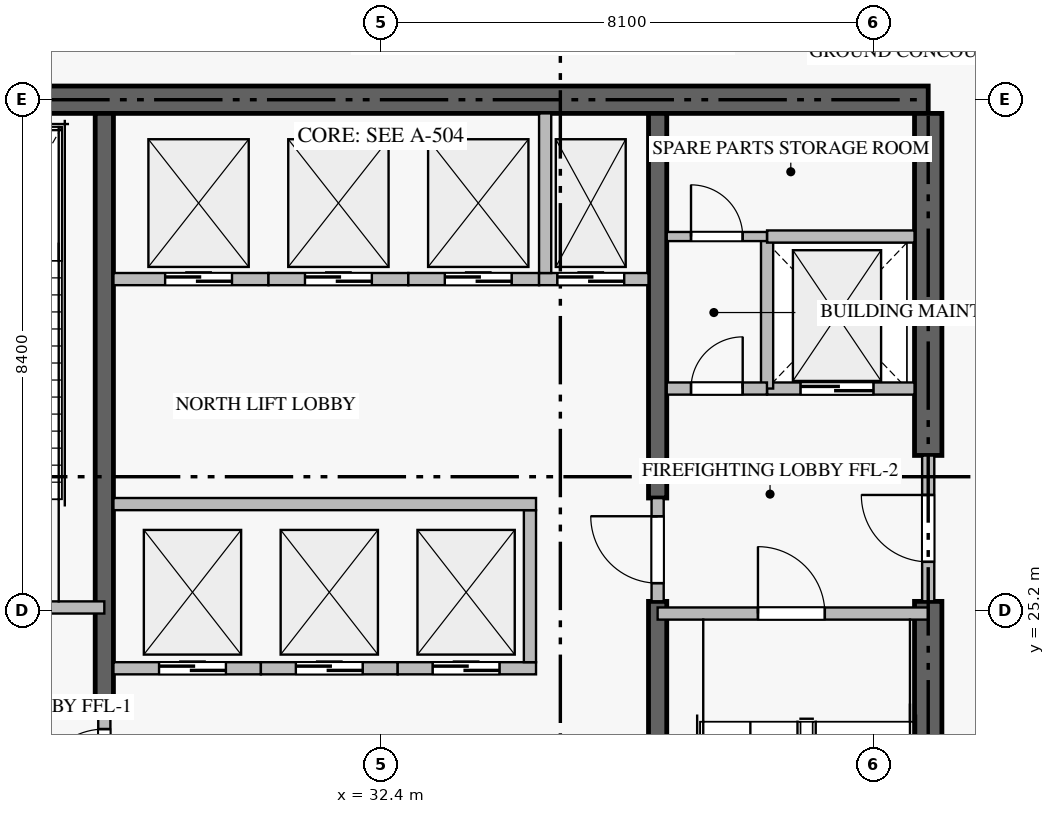
"""IFC4 building model, lengths in metres.
Left out: names, types, materials, properties, quantities, classifications, styles, units other than length and angle.
Written with IfcOpenShell. Run it as: python <this file> out.ifc"""

import sys

from ifc_helpers import new_model, si_unit, direction, frame, frame_2d, origin, place, context, subcontext, project, spatial, rectangle, extrude, source, transform, mapped, element, fill, save


model = new_model("IFC4")
c1 = context("Model", 3, precision=1e-05, world=origin(), true_north=direction((0.0, 1.0)))
c2 = subcontext(c1, "Body", "Model", "MODEL_VIEW")
j1 = project(units=[si_unit("LENGTHUNIT", "METRE"), si_unit("PLANEANGLEUNIT", "RADIAN")], contexts=[c1])
p1 = place(None, origin())
s1 = spatial("IfcSite", under=j1, at=p1, CompositionType="ELEMENT")
p2 = place(p1, origin())
s2 = spatial("IfcBuilding", under=s1, at=p2, CompositionType="ELEMENT")
p3 = place(p2, origin())
s3 = spatial("IfcBuildingStorey", under=s2, at=p3, CompositionType="ELEMENT", Elevation=0.0)
p4 = place(p3, frame((41.4, 33.6, -0.38), z_axis=(0.0, 0.0, 1.0), x_axis=(-1.0, 0.0, 0.0)))
e1 = element("IfcWall", 1, at=p4, inside=s3, PredefinedType="SHEAR", context=c2, shape_type="SweptSolid", body=[
    extrude(rectangle(XDim=18.0, YDim=0.45, at=frame_2d((9.0, 0.0))), origin(), (0.0, 0.0, 1.0), 5.498),
])
p5 = place(p3, frame((41.4, 17.025, -0.38), z_axis=(0.0, 0.0, 1.0), x_axis=(0.0, 1.0, 0.0)))
e2 = element("IfcWall", 2, at=p5, inside=s3, PredefinedType="SHEAR", context=c2, shape_type="SweptSolid", body=[
    extrude(rectangle(XDim=8.325, YDim=0.45, at=frame_2d((4.163, 0.0))), origin(), (0.0, 0.0, 1.0), 5.498),
])
p6 = place(p3, frame((41.4, 27.75, -0.38), z_axis=(0.0, 0.0, 1.0), x_axis=(0.0, 1.0, 0.0)))
e3 = element("IfcWall", 3, at=p6, inside=s3, PredefinedType="SHEAR", context=c2, shape_type="SweptSolid", body=[
    extrude(rectangle(XDim=5.625, YDim=0.45, at=frame_2d((2.812, 0.0))), origin(), (0.0, 0.0, 1.0), 5.498),
])
p7 = place(p3, frame((27.85, 23.55, -0.38), z_axis=(0.0, 0.0, 1.0), x_axis=(0.0, 1.0, 0.0)))
e4 = element("IfcWall", 4, at=p7, inside=s3, PredefinedType="SHEAR", context=c2, shape_type="SweptSolid", body=[
    extrude(rectangle(XDim=9.825, YDim=0.3, at=frame_2d((4.913, 0.0))), origin(), (0.0, 0.0, 1.0), 5.498),
])
p8 = place(p3, frame((36.95, 17.025, -0.38), z_axis=(0.0, 0.0, 1.0), x_axis=(0.0, 1.0, 0.0)))
e5 = element("IfcWall", 5, at=p8, inside=s3, PredefinedType="SHEAR", context=c2, shape_type="SweptSolid", body=[
    extrude(rectangle(XDim=8.325, YDim=0.3, at=frame_2d((4.163, 0.0))), origin(), (0.0, 0.0, 1.0), 5.498),
])
p9 = place(p3, frame((36.95, 27.05, -0.38), z_axis=(0.0, 0.0, 1.0), x_axis=(0.0, 1.0, 0.0)))
e6 = element("IfcWall", 6, at=p9, inside=s3, PredefinedType="SHEAR", context=c2, shape_type="SweptSolid", body=[
    extrude(rectangle(XDim=6.325, YDim=0.3, at=frame_2d((3.163, 0.0))), origin(), (0.0, 0.0, 1.0), 5.498),
])
p10 = place(p3, frame((23.4, 25.25, 0.0), z_axis=(0.0, 0.0, 1.0), x_axis=(1.0, 0.0, 0.0)))
e7 = element("IfcWall", 7, at=p10, inside=s3, PredefinedType="STANDARD", context=c2, shape_type="SweptSolid", body=[
    extrude(rectangle(XDim=4.45, YDim=0.2, at=frame_2d((2.225, 0.0))), origin(), (0.0, 0.0, 1.0), 5.12),
])
p11 = place(p10, frame((1.65, 0.0, 0.0)))
e8 = element("IfcOpeningElement", 8, at=p11, cuts=e7, PredefinedType="OPENING", context=c2, shape_type="SweptSolid", body=[
    extrude(rectangle(XDim=1.1, YDim=2.15, at=frame_2d((0.55, 1.075))), frame((0.0, 0.11, 0.0), z_axis=(0.0, -1.0, 0.0), x_axis=(1.0, 0.0, 0.0)), (0.0, 0.0, 1.0), 0.22),
])
p12 = place(p3, frame((36.95, 25.15, 0.0), z_axis=(0.0, 0.0, 1.0), x_axis=(1.0, 0.0, 0.0)))
e9 = element("IfcWall", 9, at=p12, inside=s3, PredefinedType="STANDARD", context=c2, shape_type="SweptSolid", body=[
    extrude(rectangle(XDim=4.45, YDim=0.2, at=frame_2d((2.225, 0.0))), origin(), (0.0, 0.0, 1.0), 5.12),
])
p13 = place(p12, frame((1.65, 0.0, 0.0)))
e10 = element("IfcOpeningElement", 10, at=p13, cuts=e9, PredefinedType="OPENING", context=c2, shape_type="SweptSolid", body=[
    extrude(rectangle(XDim=1.1, YDim=2.15, at=frame_2d((0.55, 1.075))), frame((0.0, 0.11, 0.0), z_axis=(0.0, -1.0, 0.0), x_axis=(1.0, 0.0, 0.0)), (0.0, 0.0, 1.0), 0.22),
])
p14 = place(p3, frame((38.75, 28.85, 0.0), z_axis=(0.0, 0.0, 1.0), x_axis=(1.0, 0.0, 0.0)))
e11 = element("IfcWall", 11, at=p14, inside=s3, PredefinedType="STANDARD", context=c2, shape_type="SweptSolid", body=[
    extrude(rectangle(XDim=2.425, YDim=0.2, at=frame_2d((1.212, 0.0))), origin(), (0.0, 0.0, 1.0), 5.12),
])
p15 = place(p14, frame((0.55, 0.0, 0.0)))
e12 = element("IfcOpeningElement", 12, at=p15, cuts=e11, PredefinedType="OPENING", context=c2, shape_type="SweptSolid", body=[
    extrude(rectangle(XDim=1.2, YDim=2.2, at=frame_2d((0.6, 1.1))), frame((0.0, 0.11, 0.0), z_axis=(0.0, -1.0, 0.0), x_axis=(1.0, 0.0, 0.0)), (0.0, 0.0, 1.0), 0.22),
])
p16 = place(p3, frame((28.0, 24.25, 0.0), z_axis=(0.0, 0.0, 1.0), x_axis=(1.0, 0.0, 0.0)))
e13 = element("IfcWall", 13, at=p16, inside=s3, PredefinedType="STANDARD", context=c2, shape_type="SweptSolid", body=[
    extrude(rectangle(XDim=2.425, YDim=0.2, at=frame_2d((1.212, 0.0))), origin(), (0.0, 0.0, 1.0), 5.12),
])
p17 = place(p16, frame((0.75, 0.0, 0.0)))
e14 = element("IfcOpeningElement", 14, at=p17, cuts=e13, PredefinedType="OPENING", context=c2, shape_type="SweptSolid", body=[
    extrude(rectangle(XDim=1.1, YDim=2.2, at=frame_2d((0.55, 1.1))), frame((0.0, 0.11, 0.0), z_axis=(0.0, -1.0, 0.0), x_axis=(1.0, 0.0, 0.0)), (0.0, 0.0, 1.0), 0.22),
])
p18 = place(p3, frame((30.425, 24.25, 0.0), z_axis=(0.0, 0.0, 1.0), x_axis=(1.0, 0.0, 0.0)))
e15 = element("IfcWall", 15, at=p18, inside=s3, PredefinedType="STANDARD", context=c2, shape_type="SweptSolid", body=[
    extrude(rectangle(XDim=2.25, YDim=0.2, at=frame_2d((1.125, 0.0))), origin(), (0.0, 0.0, 1.0), 5.12),
])
p19 = place(p18, frame((0.575, 0.0, 0.0)))
e16 = element("IfcOpeningElement", 16, at=p19, cuts=e15, PredefinedType="OPENING", context=c2, shape_type="SweptSolid", body=[
    extrude(rectangle(XDim=1.1, YDim=2.2, at=frame_2d((0.55, 1.1))), frame((0.0, 0.11, 0.0), z_axis=(0.0, -1.0, 0.0), x_axis=(1.0, 0.0, 0.0)), (0.0, 0.0, 1.0), 0.22),
])
p20 = place(p3, frame((32.675, 24.25, 0.0), z_axis=(0.0, 0.0, 1.0), x_axis=(1.0, 0.0, 0.0)))
e17 = element("IfcWall", 17, at=p20, inside=s3, PredefinedType="STANDARD", context=c2, shape_type="SweptSolid", body=[
    extrude(rectangle(XDim=2.275, YDim=0.2, at=frame_2d((1.137, 0.0))), origin(), (0.0, 0.0, 1.0), 5.12),
])
p21 = place(p20, frame((0.575, 0.0, 0.0)))
e18 = element("IfcOpeningElement", 18, at=p21, cuts=e17, PredefinedType="OPENING", context=c2, shape_type="SweptSolid", body=[
    extrude(rectangle(XDim=1.1, YDim=2.2, at=frame_2d((0.55, 1.1))), frame((0.0, 0.11, 0.0), z_axis=(0.0, -1.0, 0.0), x_axis=(1.0, 0.0, 0.0)), (0.0, 0.0, 1.0), 0.22),
])
p22 = place(p3, frame((34.85, 24.35, 0.0), z_axis=(0.0, 0.0, 1.0), x_axis=(0.0, 1.0, 0.0)))
e19 = element("IfcWall", 19, at=p22, inside=s3, PredefinedType="STANDARD", context=c2, shape_type="SweptSolid", body=[
    extrude(rectangle(XDim=2.5, YDim=0.2, at=frame_2d((1.25, 0.0))), origin(), (0.0, 0.0, 1.0), 5.12),
])
p23 = place(p3, frame((28.0, 30.65, 0.0), z_axis=(0.0, 0.0, 1.0), x_axis=(1.0, 0.0, 0.0)))
e20 = element("IfcWall", 20, at=p23, inside=s3, PredefinedType="STANDARD", context=c2, shape_type="SweptSolid", body=[
    extrude(rectangle(XDim=2.55, YDim=0.2, at=frame_2d((1.275, 0.0))), origin(), (0.0, 0.0, 1.0), 5.12),
])
p24 = place(p23, frame((0.85, 0.0, 0.0)))
e21 = element("IfcOpeningElement", 21, at=p24, cuts=e20, PredefinedType="OPENING", context=c2, shape_type="SweptSolid", body=[
    extrude(rectangle(XDim=1.1, YDim=2.2, at=frame_2d((0.55, 1.1))), frame((0.0, 0.11, 0.0), z_axis=(0.0, -1.0, 0.0), x_axis=(1.0, 0.0, 0.0)), (0.0, 0.0, 1.0), 0.22),
])
p25 = place(p3, frame((30.55, 30.65, 0.0), z_axis=(0.0, 0.0, 1.0), x_axis=(1.0, 0.0, 0.0)))
e22 = element("IfcWall", 22, at=p25, inside=s3, PredefinedType="STANDARD", context=c2, shape_type="SweptSolid", body=[
    extrude(rectangle(XDim=2.3, YDim=0.2, at=frame_2d((1.15, 0.0))), origin(), (0.0, 0.0, 1.0), 5.12),
])
p26 = place(p25, frame((0.6, 0.0, 0.0)))
e23 = element("IfcOpeningElement", 23, at=p26, cuts=e22, PredefinedType="OPENING", context=c2, shape_type="SweptSolid", body=[
    extrude(rectangle(XDim=1.1, YDim=2.2, at=frame_2d((0.55, 1.1))), frame((0.0, 0.11, 0.0), z_axis=(0.0, -1.0, 0.0), x_axis=(1.0, 0.0, 0.0)), (0.0, 0.0, 1.0), 0.22),
])
p27 = place(p3, frame((32.85, 30.65, 0.0), z_axis=(0.0, 0.0, 1.0), x_axis=(1.0, 0.0, 0.0)))
e24 = element("IfcWall", 24, at=p27, inside=s3, PredefinedType="STANDARD", context=c2, shape_type="SweptSolid", body=[
    extrude(rectangle(XDim=2.15, YDim=0.2, at=frame_2d((1.075, 0.0))), origin(), (0.0, 0.0, 1.0), 5.12),
])
p28 = place(p27, frame((0.6, 0.0, 0.0)))
e25 = element("IfcOpeningElement", 25, at=p28, cuts=e24, PredefinedType="OPENING", context=c2, shape_type="SweptSolid", body=[
    extrude(rectangle(XDim=1.1, YDim=2.2, at=frame_2d((0.55, 1.1))), frame((0.0, 0.11, 0.0), z_axis=(0.0, -1.0, 0.0), x_axis=(1.0, 0.0, 0.0)), (0.0, 0.0, 1.0), 0.22),
])
p29 = place(p3, frame((35.0, 30.65, 0.0), z_axis=(0.0, 0.0, 1.0), x_axis=(1.0, 0.0, 0.0)))
e26 = element("IfcWall", 26, at=p29, inside=s3, PredefinedType="STANDARD", context=c2, shape_type="SweptSolid", body=[
    extrude(rectangle(XDim=1.8, YDim=0.2, at=frame_2d((0.9, 0.0))), origin(), (0.0, 0.0, 1.0), 5.12),
])
p30 = place(p29, frame((0.3, 0.0, 0.0)))
e27 = element("IfcOpeningElement", 27, at=p30, cuts=e26, PredefinedType="OPENING", context=c2, shape_type="SweptSolid", body=[
    extrude(rectangle(XDim=1.1, YDim=2.2, at=frame_2d((0.55, 1.1))), frame((0.0, 0.11, 0.0), z_axis=(0.0, -1.0, 0.0), x_axis=(1.0, 0.0, 0.0)), (0.0, 0.0, 1.0), 0.22),
])
p31 = place(p3, frame((35.1, 30.75, 0.0), z_axis=(0.0, 0.0, 1.0), x_axis=(0.0, 1.0, 0.0)))
e28 = element("IfcWall", 28, at=p31, inside=s3, PredefinedType="STANDARD", context=c2, shape_type="SweptSolid", body=[
    extrude(rectangle(XDim=2.625, YDim=0.2, at=frame_2d((1.312, 0.0))), origin(), (0.0, 0.0, 1.0), 5.12),
])
p32 = place(p3, frame((38.75, 28.85, 0.0), z_axis=(0.0, 0.0, 1.0), x_axis=(0.0, 1.0, 0.0)))
e29 = element("IfcWall", 29, at=p32, inside=s3, PredefinedType="STANDARD", context=c2, shape_type="SweptSolid", body=[
    extrude(rectangle(XDim=2.5, YDim=0.2, at=frame_2d((1.25, 0.0))), origin(), (0.0, 0.0, 1.0), 5.12),
])
p33 = place(p3, frame((38.75, 31.35, 0.0), z_axis=(0.0, 0.0, 1.0), x_axis=(1.0, 0.0, 0.0)))
e30 = element("IfcWall", 30, at=p33, inside=s3, PredefinedType="STANDARD", context=c2, shape_type="SweptSolid", body=[
    extrude(rectangle(XDim=2.425, YDim=0.2, at=frame_2d((1.212, 0.0))), origin(), (0.0, 0.0, 1.0), 5.12),
])
p34 = place(p3, frame((37.1, 28.85, 0.0), z_axis=(0.0, 0.0, 1.0), x_axis=(1.0, 0.0, 0.0)))
e31 = element("IfcWall", 31, at=p34, inside=s3, PredefinedType="STANDARD", context=c2, shape_type="SweptSolid", body=[
    extrude(rectangle(XDim=1.648, YDim=0.2, at=frame_2d((0.824, 0.0))), origin(), (0.0, 0.0, 1.0), 5.12),
])
p35 = place(p34, frame((0.399, 0.0, 0.0)))
e32 = element("IfcOpeningElement", 32, at=p35, cuts=e31, PredefinedType="OPENING", context=c2, shape_type="SweptSolid", body=[
    extrude(rectangle(XDim=0.85, YDim=2.1, at=frame_2d((0.425, 1.05))), frame((0.0, 0.11, 0.0), z_axis=(0.0, -1.0, 0.0), x_axis=(1.0, 0.0, 0.0)), (0.0, 0.0, 1.0), 0.22),
])
p36 = place(p3, frame((41.4, 25.352, 0.0), z_axis=(0.0, 0.0, 1.0), x_axis=(0.0, 1.0, 0.0)))
e33 = element("IfcWall", 33, at=p36, inside=s3, PredefinedType="STANDARD", context=c2, shape_type="SweptSolid", body=[
    extrude(rectangle(XDim=2.396, YDim=0.2, at=frame_2d((1.198, 0.0))), origin(), (0.0, 0.0, 1.0), 5.12),
])
p37 = place(p36, frame((0.648, 0.0, 0.0)))
e34 = element("IfcOpeningElement", 34, at=p37, cuts=e33, PredefinedType="OPENING", context=c2, shape_type="SweptSolid", body=[
    extrude(rectangle(XDim=1.1, YDim=2.15, at=frame_2d((0.55, 1.075))), frame((0.0, 0.11, 0.0), z_axis=(0.0, -1.0, 0.0), x_axis=(1.0, 0.0, 0.0)), (0.0, 0.0, 1.0), 0.22),
])
p38 = place(p3, frame((27.85, 21.852, 0.0), z_axis=(0.0, 0.0, 1.0), x_axis=(0.0, 1.0, 0.0)))
e35 = element("IfcWall", 35, at=p38, inside=s3, PredefinedType="STANDARD", context=c2, shape_type="SweptSolid", body=[
    extrude(rectangle(XDim=1.696, YDim=0.2, at=frame_2d((0.848, 0.0))), origin(), (0.0, 0.0, 1.0), 5.12),
])
p39 = place(p38, frame((0.298, 0.0, 0.0)))
e36 = element("IfcOpeningElement", 36, at=p39, cuts=e35, PredefinedType="OPENING", context=c2, shape_type="SweptSolid", body=[
    extrude(rectangle(XDim=1.1, YDim=2.15, at=frame_2d((0.55, 1.075))), frame((0.0, 0.11, 0.0), z_axis=(0.0, -1.0, 0.0), x_axis=(1.0, 0.0, 0.0)), (0.0, 0.0, 1.0), 0.22),
])
p40 = place(p3, frame((36.95, 25.352, 0.0), z_axis=(0.0, 0.0, 1.0), x_axis=(0.0, 1.0, 0.0)))
e37 = element("IfcWall", 37, at=p40, inside=s3, PredefinedType="STANDARD", context=c2, shape_type="SweptSolid", body=[
    extrude(rectangle(XDim=1.696, YDim=0.2, at=frame_2d((0.848, 0.0))), origin(), (0.0, 0.0, 1.0), 5.12),
])
p41 = place(p40, frame((0.298, 0.0, 0.0)))
e38 = element("IfcOpeningElement", 38, at=p41, cuts=e37, PredefinedType="OPENING", context=c2, shape_type="SweptSolid", body=[
    extrude(rectangle(XDim=1.1, YDim=2.15, at=frame_2d((0.55, 1.075))), frame((0.0, 0.11, 0.0), z_axis=(0.0, -1.0, 0.0), x_axis=(1.0, 0.0, 0.0)), (0.0, 0.0, 1.0), 0.22),
])
p42 = place(p3, frame((28.0, 26.95, 0.0), z_axis=(0.0, 0.0, 1.0), x_axis=(1.0, 0.0, 0.0)))
e39 = element("IfcWall", 39, at=p42, inside=s3, PredefinedType="STANDARD", context=c2, shape_type="SweptSolid", body=[
    extrude(rectangle(XDim=6.95, YDim=0.2, at=frame_2d((3.475, 0.0))), origin(), (0.0, 0.0, 1.0), 5.12),
])
p43 = place(p3, frame((37.1, 31.35, 0.0), z_axis=(0.0, 0.0, 1.0), x_axis=(1.0, 0.0, 0.0)))
e40 = element("IfcWall", 40, at=p43, inside=s3, PredefinedType="PARTITIONING", context=c2, shape_type="SweptSolid", body=[
    extrude(rectangle(XDim=1.648, YDim=0.15, at=frame_2d((0.824, 0.0))), origin(), (0.0, 0.0, 1.0), 5.12),
])
p44 = place(p43, frame((0.399, 0.0, 0.0)))
e41 = element("IfcOpeningElement", 41, at=p44, cuts=e40, PredefinedType="OPENING", context=c2, shape_type="SweptSolid", body=[
    extrude(rectangle(XDim=0.85, YDim=2.1, at=frame_2d((0.425, 1.05))), frame((0.0, 0.085, 0.0), z_axis=(0.0, -1.0, 0.0), x_axis=(1.0, 0.0, 0.0)), (0.0, 0.0, 1.0), 0.17),
])
m1 = source(origin(), c2, "Body", "SweptSolid", [
    extrude(rectangle(XDim=1.1, YDim=2.15, at=frame_2d((0.55, 1.075))), frame((0.0, 0.025, 0.0), z_axis=(0.0, -1.0, 0.0), x_axis=(1.0, 0.0, 0.0)), (0.0, 0.0, 1.0), 0.05),
])
p45 = place(p13, origin())
e42 = element("IfcDoor", 42, at=p45, inside=s3, OperationType="SINGLE_SWING_LEFT", PredefinedType="DOOR", context=c2, shape_type="MappedRepresentation", body=[
    mapped(m1, transform((0.0, 0.0, 0.0), scale=1.0)),
])
fill(e10, e42)
m2 = source(origin(), c2, "Body", "SweptSolid", [
    extrude(rectangle(XDim=1.2, YDim=2.2, at=frame_2d((0.6, 1.1))), frame((0.0, 0.025, 0.0), z_axis=(0.0, -1.0, 0.0), x_axis=(1.0, 0.0, 0.0)), (0.0, 0.0, 1.0), 0.05),
])
p46 = place(p15, origin())
e43 = element("IfcDoor", 43, at=p46, inside=s3, OperationType="DOUBLE_DOOR_SLIDING", PredefinedType="DOOR", context=c2, shape_type="MappedRepresentation", body=[
    mapped(m2, transform((0.0, 0.0, 0.0), scale=1.0)),
])
fill(e12, e43)
m3 = source(origin(), c2, "Body", "SweptSolid", [
    extrude(rectangle(XDim=1.1, YDim=2.2, at=frame_2d((0.55, 1.1))), frame((0.0, 0.025, 0.0), z_axis=(0.0, -1.0, 0.0), x_axis=(1.0, 0.0, 0.0)), (0.0, 0.0, 1.0), 0.05),
])
p47 = place(p17, origin())
e44 = element("IfcDoor", 44, at=p47, inside=s3, OperationType="DOUBLE_DOOR_SLIDING", PredefinedType="DOOR", context=c2, shape_type="MappedRepresentation", body=[
    mapped(m3, transform((0.0, 0.0, 0.0), scale=1.0)),
])
fill(e14, e44)
p48 = place(p19, origin())
e45 = element("IfcDoor", 45, at=p48, inside=s3, OperationType="DOUBLE_DOOR_SLIDING", PredefinedType="DOOR", context=c2, shape_type="MappedRepresentation", body=[
    mapped(m3, transform((0.0, 0.0, 0.0), scale=1.0)),
])
fill(e16, e45)
p49 = place(p21, origin())
e46 = element("IfcDoor", 46, at=p49, inside=s3, OperationType="DOUBLE_DOOR_SLIDING", PredefinedType="DOOR", context=c2, shape_type="MappedRepresentation", body=[
    mapped(m3, transform((0.0, 0.0, 0.0), scale=1.0)),
])
fill(e18, e46)
p50 = place(p24, origin())
e47 = element("IfcDoor", 47, at=p50, inside=s3, OperationType="DOUBLE_DOOR_SLIDING", PredefinedType="DOOR", context=c2, shape_type="MappedRepresentation", body=[
    mapped(m3, transform((0.0, 0.0, 0.0), scale=1.0)),
])
fill(e21, e47)
p51 = place(p26, origin())
e48 = element("IfcDoor", 48, at=p51, inside=s3, OperationType="DOUBLE_DOOR_SLIDING", PredefinedType="DOOR", context=c2, shape_type="MappedRepresentation", body=[
    mapped(m3, transform((0.0, 0.0, 0.0), scale=1.0)),
])
fill(e23, e48)
p52 = place(p28, origin())
e49 = element("IfcDoor", 49, at=p52, inside=s3, OperationType="DOUBLE_DOOR_SLIDING", PredefinedType="DOOR", context=c2, shape_type="MappedRepresentation", body=[
    mapped(m3, transform((0.0, 0.0, 0.0), scale=1.0)),
])
fill(e25, e49)
p53 = place(p30, origin())
e50 = element("IfcDoor", 50, at=p53, inside=s3, OperationType="DOUBLE_DOOR_SLIDING", PredefinedType="DOOR", context=c2, shape_type="MappedRepresentation", body=[
    mapped(m3, transform((0.0, 0.0, 0.0), scale=1.0)),
])
fill(e27, e50)
m4 = source(origin(), c2, "Body", "SweptSolid", [
    extrude(rectangle(XDim=0.85, YDim=2.1, at=frame_2d((0.425, 1.05))), frame((0.0, 0.025, 0.0), z_axis=(0.0, -1.0, 0.0), x_axis=(1.0, 0.0, 0.0)), (0.0, 0.0, 1.0), 0.05),
])
p54 = place(p35, origin())
e51 = element("IfcDoor", 51, at=p54, inside=s3, OperationType="SINGLE_SWING_RIGHT", PredefinedType="DOOR", context=c2, shape_type="MappedRepresentation", body=[
    mapped(m4, transform((0.0, 0.0, 0.0), scale=1.0)),
])
fill(e32, e51)
p55 = place(p37, origin())
e52 = element("IfcDoor", 52, at=p55, inside=s3, OperationType="SINGLE_SWING_RIGHT", PredefinedType="DOOR", context=c2, shape_type="MappedRepresentation", body=[
    mapped(m1, transform((0.0, 0.0, 0.0), scale=1.0)),
])
fill(e34, e52)
p56 = place(p39, origin())
e53 = element("IfcDoor", 53, at=p56, inside=s3, OperationType="SINGLE_SWING_LEFT", PredefinedType="DOOR", context=c2, shape_type="MappedRepresentation", body=[
    mapped(m1, transform((0.0, 0.0, 0.0), scale=1.0)),
])
fill(e36, e53)
p57 = place(p41, origin())
e54 = element("IfcDoor", 54, at=p57, inside=s3, OperationType="SINGLE_SWING_RIGHT", PredefinedType="DOOR", context=c2, shape_type="MappedRepresentation", body=[
    mapped(m1, transform((0.0, 0.0, 0.0), scale=1.0)),
])
fill(e38, e54)
p58 = place(p44, origin())
e55 = element("IfcDoor", 55, at=p58, inside=s3, OperationType="SINGLE_SWING_LEFT", PredefinedType="DOOR", context=c2, shape_type="MappedRepresentation", body=[
    mapped(m4, transform((0.0, 0.0, 0.0), scale=1.0)),
])
fill(e41, e55)
save(model, sys.argv[1])
